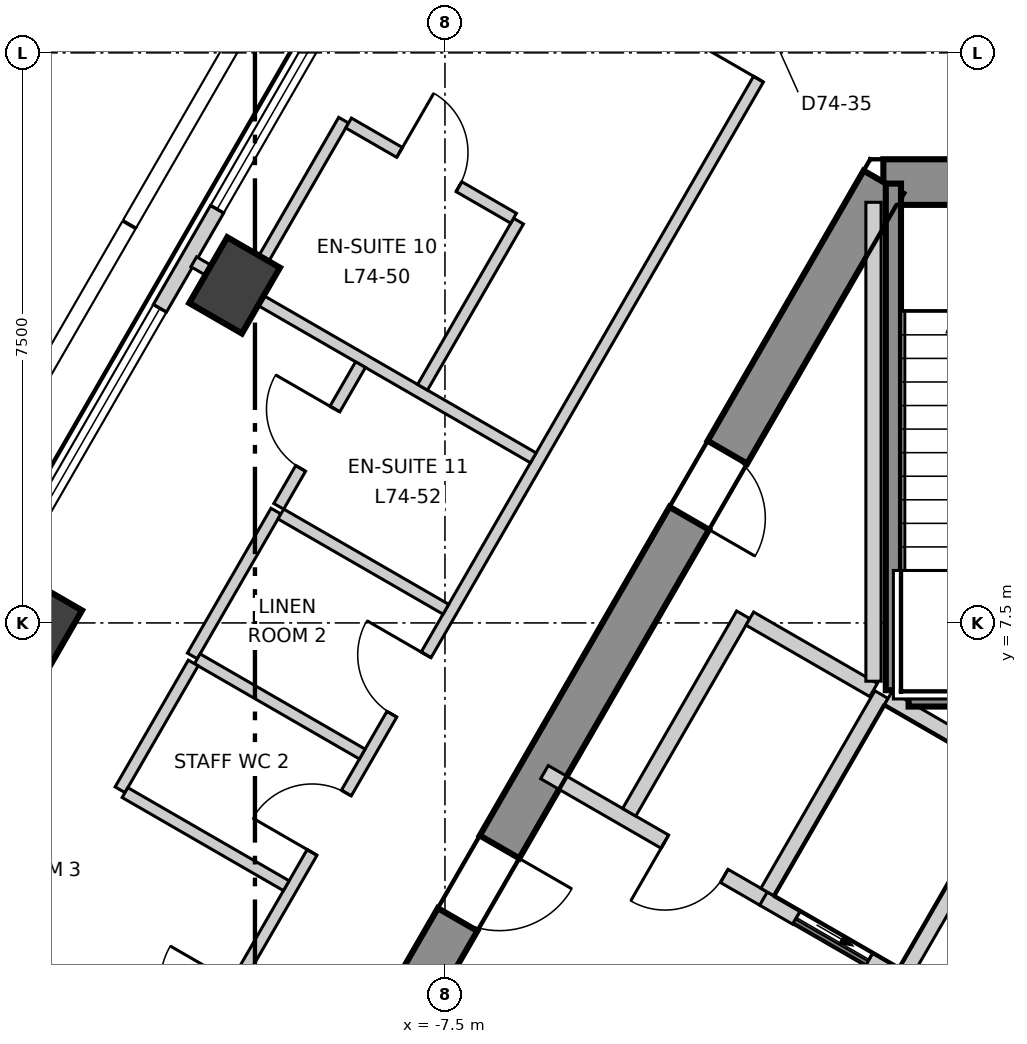
"""IFC4 building model, lengths in metres.
Left out: names, types, materials, properties, quantities, classifications, styles, units other than length and angle.
Written with IfcOpenShell. Run it as: python <this file> out.ifc"""

import sys

from ifc_helpers import new_model, si_unit, direction, frame, frame_2d, origin, origin_2d, place, context, subcontext, project, spatial, polyline, rectangle, outline, extrude, element, fill, save


model = new_model("IFC4")
c1 = context("Model", 3, precision=1e-05, world=origin(), true_north=direction((0.0, 1.0)))
c2 = subcontext(c1, "Body", "Model", "MODEL_VIEW")
j1 = project(units=[si_unit("LENGTHUNIT", "METRE"), si_unit("PLANEANGLEUNIT", "RADIAN")], contexts=[c1])
p1 = place(None, origin())
s1 = spatial("IfcSite", under=j1, at=p1, CompositionType="ELEMENT")
p2 = place(p1, origin())
s2 = spatial("IfcBuilding", under=s1, at=p2, CompositionType="ELEMENT")
p3 = place(p2, frame((0.0, 0.0, 311.5)))
s3 = spatial("IfcBuildingStorey", under=s2, at=p3, CompositionType="ELEMENT", Elevation=311.5)
p4 = place(p3, frame((1.732, 13.3, -0.3), z_axis=(0.0, 0.0, 1.0), x_axis=(-1.0, 0.0, 0.0)))
e1 = element("IfcWall", 1, at=p4, inside=s3, PredefinedType="SHEAR", context=c2, shape_type="SweptSolid", body=[
    extrude(outline(polyline([(-0.173, -0.3), (1.732, -0.3), (3.637, -0.3), (3.291, 0.3), (1.732, 0.3), (0.173, 0.3), (-0.173, -0.3)])), origin(), (0.0, 0.0, 1.0), 3.6),
])
p5 = place(p4, frame((1.032, 0.0, 0.3)))
e2 = element("IfcOpeningElement", 2, at=p5, cuts=e1, PredefinedType="OPENING", context=c2, shape_type="SweptSolid", body=[
    extrude(rectangle(XDim=1.4, YDim=2.1, at=frame_2d((0.7, 1.05))), frame((0.0, 0.31, 0.0), z_axis=(0.0, -1.0, 0.0), x_axis=(1.0, 0.0, 0.0)), (0.0, 0.0, 1.0), 0.62),
])
p6 = place(p3, frame((-1.732, 13.3, -0.3), z_axis=(0.0, 0.0, 1.0), x_axis=(-0.500000539815, -0.866025092122, 0.0)))
e3 = element("IfcWall", 3, at=p6, inside=s3, PredefinedType="SHEAR", context=c2, shape_type="SweptSolid", body=[
    extrude(outline(polyline([(-0.173, -0.3), (1.795, -0.3), (3.763, -0.3), (5.732, -0.3), (7.7, -0.3), (9.668, -0.301), (11.637, -0.301), (13.605, -0.301), (15.573, -0.301), (17.542, -0.301), (19.51, -0.301), (21.478, -0.301), (21.131, 0.3), (19.226, 0.3), (17.321, 0.3), (15.415, 0.3), (13.51, 0.3), (11.605, 0.3), (9.699, 0.3), (7.794, 0.3), (5.889, 0.3), (3.984, 0.3), (2.078, 0.3), (0.173, 0.3), (-0.173, -0.3)])), origin(), (0.0, 0.0, 1.0), 3.6),
])
p7 = place(p6, frame((10.102, 0.0, 0.3)))
e4 = element("IfcOpeningElement", 4, at=p7, cuts=e3, PredefinedType="OPENING", context=c2, shape_type="SweptSolid", body=[
    extrude(rectangle(XDim=1.1, YDim=2.1, at=frame_2d((0.55, 1.05))), frame((0.0, 0.31, 0.0), z_axis=(0.0, -1.0, 0.0), x_axis=(1.0, 0.0, 0.0)), (0.0, 0.0, 1.0), 0.621),
])
p8 = place(p6, frame((16.378, 0.0, 0.3)))
e5 = element("IfcOpeningElement", 5, at=p8, cuts=e3, PredefinedType="OPENING", context=c2, shape_type="SweptSolid", body=[
    extrude(rectangle(XDim=0.9, YDim=2.1, at=frame_2d((0.45, 1.05))), frame((0.0, 0.31, 0.0), z_axis=(0.0, -1.0, 0.0), x_axis=(1.0, 0.0, 0.0)), (0.0, 0.0, 1.0), 0.621),
])
p9 = place(p6, frame((4.106, 0.0, 0.3)))
e6 = element("IfcOpeningElement", 6, at=p9, cuts=e3, PredefinedType="OPENING", context=c2, shape_type="SweptSolid", body=[
    extrude(rectangle(XDim=1.0, YDim=2.1, at=frame_2d((0.5, 1.05))), frame((0.0, 0.31, 0.0), z_axis=(0.0, -1.0, 0.0), x_axis=(1.0, 0.0, 0.0)), (0.0, 0.0, 1.0), 0.621),
])
for number, where, z_axis, x_axis in (
    (7, (-10.268, 11.941, -0.3), (0.0, 0.0, 1.0), (0.5, 0.866, 0.0)),
    (8, (-12.872, 7.432, -0.3), (0.0, 0.0, 1.0), (0.5, 0.866, 0.0)),
):
    element("IfcColumn", number, at=place(p3, frame(where, z_axis=z_axis, x_axis=x_axis)), inside=s3, PredefinedType="COLUMN", context=c2, shape_type="SweptSolid", body=[
        extrude(rectangle(XDim=1.0, YDim=0.8, at=origin_2d()), origin(), (0.0, 0.0, 1.0), 3.6),
    ])
p10 = place(p3, frame((-2.412, 26.948, 0.0), z_axis=(0.0, 0.0, 1.0), x_axis=(-0.500002044679, -0.866024223285, 0.0)))
e9 = element("IfcWall", 9, at=p10, inside=s3, PredefinedType="ELEMENTEDWALL", context=c2, shape_type="SweptSolid", body=[
    extrude(rectangle(XDim=44.243, YDim=0.2, at=frame_2d((22.122, 0.0))), origin(), (0.0, 0.0, 1.0), 3.3),
])
p11 = place(p10, frame((2.056, 0.0, 0.9)))
e10 = element("IfcOpeningElement", 10, at=p11, cuts=e9, PredefinedType="OPENING", context=c2, shape_type="SweptSolid", body=[
    extrude(rectangle(XDim=3.7, YDim=2.2, at=frame_2d((1.85, 1.1))), frame((0.0, 0.11, 0.0), z_axis=(0.0, -1.0, 0.0), x_axis=(1.0, 0.0, 0.0)), (0.0, 0.0, 1.0), 0.22),
])
p12 = place(p10, frame((7.263, 0.0, 0.9)))
e11 = element("IfcOpeningElement", 11, at=p12, cuts=e9, PredefinedType="OPENING", context=c2, shape_type="SweptSolid", body=[
    extrude(rectangle(XDim=3.7, YDim=2.2, at=frame_2d((1.85, 1.1))), frame((0.0, 0.11, 0.0), z_axis=(0.0, -1.0, 0.0), x_axis=(1.0, 0.0, 0.0)), (0.0, 0.0, 1.0), 0.22),
])
p13 = place(p10, frame((12.471, 0.0, 0.9)))
e12 = element("IfcOpeningElement", 12, at=p13, cuts=e9, PredefinedType="OPENING", context=c2, shape_type="SweptSolid", body=[
    extrude(rectangle(XDim=3.7, YDim=2.2, at=frame_2d((1.85, 1.1))), frame((0.0, 0.11, 0.0), z_axis=(0.0, -1.0, 0.0), x_axis=(1.0, 0.0, 0.0)), (0.0, 0.0, 1.0), 0.22),
])
p14 = place(p10, frame((17.678, 0.0, 0.9)))
e13 = element("IfcOpeningElement", 13, at=p14, cuts=e9, PredefinedType="OPENING", context=c2, shape_type="SweptSolid", body=[
    extrude(rectangle(XDim=3.7, YDim=2.2, at=frame_2d((1.85, 1.1))), frame((0.0, 0.11, 0.0), z_axis=(0.0, -1.0, 0.0), x_axis=(1.0, 0.0, 0.0)), (0.0, 0.0, 1.0), 0.22),
])
p15 = place(p10, frame((22.885, 0.0, 0.9)))
e14 = element("IfcOpeningElement", 14, at=p15, cuts=e9, PredefinedType="OPENING", context=c2, shape_type="SweptSolid", body=[
    extrude(rectangle(XDim=3.7, YDim=2.2, at=frame_2d((1.85, 1.1))), frame((0.0, 0.11, 0.0), z_axis=(0.0, -1.0, 0.0), x_axis=(1.0, 0.0, 0.0)), (0.0, 0.0, 1.0), 0.22),
])
p16 = place(p10, frame((28.092, 0.0, 0.9)))
e15 = element("IfcOpeningElement", 15, at=p16, cuts=e9, PredefinedType="OPENING", context=c2, shape_type="SweptSolid", body=[
    extrude(rectangle(XDim=3.7, YDim=2.2, at=frame_2d((1.85, 1.1))), frame((0.0, 0.11, 0.0), z_axis=(0.0, -1.0, 0.0), x_axis=(1.0, 0.0, 0.0)), (0.0, 0.0, 1.0), 0.22),
])
p17 = place(p10, frame((33.3, 0.0, 0.9)))
e16 = element("IfcOpeningElement", 16, at=p17, cuts=e9, PredefinedType="OPENING", context=c2, shape_type="SweptSolid", body=[
    extrude(rectangle(XDim=3.7, YDim=2.2, at=frame_2d((1.85, 1.1))), frame((0.0, 0.11, 0.0), z_axis=(0.0, -1.0, 0.0), x_axis=(1.0, 0.0, 0.0)), (0.0, 0.0, 1.0), 0.22),
])
p18 = place(p10, frame((38.507, 0.0, 0.9)))
e17 = element("IfcOpeningElement", 17, at=p18, cuts=e9, PredefinedType="OPENING", context=c2, shape_type="SweptSolid", body=[
    extrude(rectangle(XDim=3.7, YDim=2.2, at=frame_2d((1.85, 1.1))), frame((0.0, 0.11, 0.0), z_axis=(0.0, -1.0, 0.0), x_axis=(1.0, 0.0, 0.0)), (0.0, 0.0, 1.0), 0.22),
])
p19 = place(p3, frame((-17.678, -10.12, 0.0), z_axis=(0.0, 0.0, 1.0), x_axis=(0.49998824015, 0.86603219323, 0.0)))
e18 = element("IfcWall", 18, at=p19, inside=s3, PredefinedType="PARTITIONING", context=c2, shape_type="SweptSolid", body=[
    extrude(rectangle(XDim=35.357, YDim=0.15, at=frame_2d((17.678, 0.0))), origin(), (0.0, 0.0, 1.0), 3.3),
])
p20 = place(p19, frame((28.607, 0.0, 0.0)))
e19 = element("IfcOpeningElement", 19, at=p20, cuts=e18, PredefinedType="OPENING", context=c2, shape_type="SweptSolid", body=[
    extrude(rectangle(XDim=1.0, YDim=2.1, at=frame_2d((0.5, 1.05))), frame((0.0, 0.085, 0.0), z_axis=(0.0, -1.0, 0.0), x_axis=(1.0, 0.0, 0.0)), (0.0, 0.0, 1.0), 0.17),
])
p21 = place(p19, frame((13.86, 0.0, 0.0)))
e20 = element("IfcOpeningElement", 20, at=p21, cuts=e18, PredefinedType="OPENING", context=c2, shape_type="SweptSolid", body=[
    extrude(rectangle(XDim=1.0, YDim=2.1, at=frame_2d((0.5, 1.05))), frame((0.0, 0.085, 0.0), z_axis=(0.0, -1.0, 0.0), x_axis=(1.0, 0.0, 0.0)), (0.0, 0.0, 1.0), 0.17),
])
p22 = place(p19, frame((18.96, 0.0, 0.0)))
e21 = element("IfcOpeningElement", 21, at=p22, cuts=e18, PredefinedType="OPENING", context=c2, shape_type="SweptSolid", body=[
    extrude(rectangle(XDim=0.9, YDim=2.1, at=frame_2d((0.45, 1.05))), frame((0.0, 0.085, 0.0), z_axis=(0.0, -1.0, 0.0), x_axis=(1.0, 0.0, 0.0)), (0.0, 0.0, 1.0), 0.17),
])
p23 = place(p19, frame((16.86, 0.0, 0.0)))
e22 = element("IfcOpeningElement", 22, at=p23, cuts=e18, PredefinedType="OPENING", context=c2, shape_type="SweptSolid", body=[
    extrude(rectangle(XDim=0.9, YDim=2.1, at=frame_2d((0.45, 1.05))), frame((0.0, 0.085, 0.0), z_axis=(0.0, -1.0, 0.0), x_axis=(1.0, 0.0, 0.0)), (0.0, 0.0, 1.0), 0.17),
])
p24 = place(p19, frame((8.146, 0.0, 0.0)))
e23 = element("IfcOpeningElement", 23, at=p24, cuts=e18, PredefinedType="OPENING", context=c2, shape_type="SweptSolid", body=[
    extrude(rectangle(XDim=1.0, YDim=2.1, at=frame_2d((0.5, 1.05))), frame((0.0, 0.085, 0.0), z_axis=(0.0, -1.0, 0.0), x_axis=(1.0, 0.0, 0.0)), (0.0, 0.0, 1.0), 0.17),
])
p25 = place(p19, frame((3.038, 0.0, 0.0)))
e24 = element("IfcOpeningElement", 24, at=p25, cuts=e18, PredefinedType="OPENING", context=c2, shape_type="SweptSolid", body=[
    extrude(rectangle(XDim=1.0, YDim=2.1, at=frame_2d((0.5, 1.05))), frame((0.0, 0.085, 0.0), z_axis=(0.0, -1.0, 0.0), x_axis=(1.0, 0.0, 0.0)), (0.0, 0.0, 1.0), 0.17),
])
for number, where, z_axis, x_axis in (
    (25, (-16.012, 3.232, 0.0), (0.0, 0.0, 1.0), (0.866, -0.5, 0.0)),
    (26, (-10.805, 12.251, 0.0), (0.0, 0.0, 1.0), (0.866, -0.5, 0.0)),
):
    element("IfcWall", number, at=place(p3, frame(where, z_axis=z_axis, x_axis=x_axis)), inside=s3, PredefinedType="PARTITIONING", context=c2, shape_type="SweptSolid", body=[
        extrude(rectangle(XDim=5.158, YDim=0.15, at=frame_2d((2.579, 0.0))), origin(), (0.0, 0.0, 1.0), 3.3),
    ])
p26 = place(p3, frame((-10.824, 7.066, 0.0), z_axis=(0.0, 0.0, 1.0), x_axis=(0.499994660107, 0.866028486751, 0.0)))
e27 = element("IfcWall", 27, at=p26, inside=s3, PredefinedType="PARTITIONING", context=c2, shape_type="SweptSolid", body=[
    extrude(rectangle(XDim=2.2, YDim=0.15, at=frame_2d((1.1, 0.0))), origin(), (0.0, 0.0, 1.0), 3.3),
])
p27 = place(p3, frame((-10.759, 7.028, 0.0), z_axis=(0.0, 0.0, 1.0), x_axis=(0.866083422639, -0.499899494929, 0.0)))
e28 = element("IfcWall", 28, at=p27, inside=s3, PredefinedType="PARTITIONING", context=c2, shape_type="SweptSolid", body=[
    extrude(rectangle(XDim=2.507, YDim=0.15, at=frame_2d((1.253, 0.0))), origin(), (0.0, 0.0, 1.0), 3.3),
])
p28 = place(p3, frame((-11.775, 5.305, 0.0), z_axis=(0.0, 0.0, 1.0), x_axis=(0.49995654735, 0.86605048973, 0.0)))
e29 = element("IfcWall", 29, at=p28, inside=s3, PredefinedType="PARTITIONING", context=c2, shape_type="SweptSolid", body=[
    extrude(rectangle(XDim=1.926, YDim=0.15, at=frame_2d((0.963, 0.0))), origin(), (0.0, 0.0, 1.0), 3.3),
])
p29 = place(p3, frame((-11.71, 5.268, 0.0), z_axis=(0.0, 0.0, 1.0), x_axis=(0.8660395779, -0.499975448907, 0.0)))
e30 = element("IfcWall", 30, at=p29, inside=s3, PredefinedType="PARTITIONING", context=c2, shape_type="SweptSolid", body=[
    extrude(rectangle(XDim=2.45, YDim=0.15, at=frame_2d((1.225, 0.0))), origin(), (0.0, 0.0, 1.0), 3.3),
])
p30 = place(p3, frame((-9.659, 8.933, 0.0), z_axis=(0.0, 0.0, 1.0), x_axis=(0.866059082011, -0.499941663064, 0.0)))
e31 = element("IfcWall", 31, at=p30, inside=s3, PredefinedType="PARTITIONING", context=c2, shape_type="SweptSolid", body=[
    extrude(rectangle(XDim=2.507, YDim=0.15, at=frame_2d((1.253, 0.0))), origin(), (0.0, 0.0, 1.0), 3.3),
])
p31 = place(p3, frame((-10.095, 11.928, 0.0), z_axis=(0.0, 0.0, 1.0), x_axis=(0.499956887143, 0.866050293573, 0.0)))
e32 = element("IfcWall", 32, at=p31, inside=s3, PredefinedType="PARTITIONING", context=c2, shape_type="SweptSolid", body=[
    extrude(rectangle(XDim=2.524, YDim=0.15, at=frame_2d((1.262, 0.0))), origin(), (0.0, 0.0, 1.0), 2.6),
])
p32 = place(p3, frame((-7.795, 10.6, 0.0), z_axis=(0.0, 0.0, 1.0), x_axis=(0.50028887667, 0.865858556509, 0.0)))
e33 = element("IfcWall", 33, at=p32, inside=s3, PredefinedType="PARTITIONING", context=c2, shape_type="SweptSolid", body=[
    extrude(rectangle(XDim=2.524, YDim=0.15, at=frame_2d((1.262, 0.0))), origin(), (0.0, 0.0, 1.0), 3.3),
])
p33 = place(p3, frame((-9.687, 9.034, 0.0), z_axis=(0.0, 0.0, 1.0), x_axis=(0.499909024581, 0.866077922096, 0.0)))
e34 = element("IfcWall", 34, at=p33, inside=s3, PredefinedType="PARTITIONING", context=c2, shape_type="SweptSolid", body=[
    extrude(rectangle(XDim=2.152, YDim=0.15, at=frame_2d((1.076, 0.0))), origin(), (0.0, 0.0, 1.0), 3.3),
])
p34 = place(p33, frame((0.577, 0.0, 0.0)))
e35 = element("IfcOpeningElement", 35, at=p34, cuts=e34, PredefinedType="OPENING", context=c2, shape_type="SweptSolid", body=[
    extrude(rectangle(XDim=0.9, YDim=2.1, at=frame_2d((0.45, 1.05))), frame((0.0, 0.085, 0.0), z_axis=(0.0, -1.0, 0.0), x_axis=(1.0, 0.0, 0.0)), (0.0, 0.0, 1.0), 0.17),
])
p35 = place(p3, frame((-8.768, 14.077, 0.0), z_axis=(0.0, 0.0, 1.0), x_axis=(0.866125586781, -0.4998264378, 0.0)))
e36 = element("IfcWall", 36, at=p35, inside=s3, PredefinedType="PARTITIONING", context=c2, shape_type="SweptSolid", body=[
    extrude(rectangle(XDim=2.507, YDim=0.15, at=frame_2d((1.253, 0.0))), origin(), (0.0, 0.0, 1.0), 3.3),
])
p36 = place(p35, frame((0.775, 0.0, 0.0)))
e37 = element("IfcOpeningElement", 37, at=p36, cuts=e36, PredefinedType="OPENING", context=c2, shape_type="SweptSolid", body=[
    extrude(rectangle(XDim=0.9, YDim=2.1, at=frame_2d((0.45, 1.05))), frame((0.0, 0.085, 0.0), z_axis=(0.0, -1.0, 0.0), x_axis=(1.0, 0.0, 0.0)), (0.0, 0.0, 1.0), 0.17),
])
p37 = place(p3, frame((-6.191, 5.537, 0.0), z_axis=(0.0, 0.0, 1.0), x_axis=(0.866052607023, -0.499952879648, 0.0)))
e38 = element("IfcWall", 38, at=p37, inside=s3, PredefinedType="SOLIDWALL", context=c2, shape_type="SweptSolid", body=[
    extrude(rectangle(XDim=3.332, YDim=0.2, at=frame_2d((1.666, 0.0))), origin(), (0.0, 0.0, 1.0), 3.3),
])
p38 = place(p37, frame((1.83, 0.0, 0.0)))
e39 = element("IfcOpeningElement", 39, at=p38, cuts=e38, PredefinedType="OPENING", context=c2, shape_type="SweptSolid", body=[
    extrude(rectangle(XDim=0.9, YDim=2.1, at=frame_2d((0.45, 1.05))), frame((0.0, 0.11, 0.0), z_axis=(0.0, -1.0, 0.0), x_axis=(1.0, 0.0, 0.0)), (0.0, 0.0, 1.0), 0.22),
])
p39 = place(p3, frame((-5.076, 5.009, 0.0), z_axis=(0.0, 0.0, 1.0), x_axis=(0.50002537861, 0.866010750942, 0.0)))
e40 = element("IfcWall", 40, at=p39, inside=s3, PredefinedType="SOLIDWALL", context=c2, shape_type="SweptSolid", body=[
    extrude(rectangle(XDim=3.0, YDim=0.2, at=frame_2d((1.5, 0.0))), origin(), (0.0, 0.0, 1.0), 3.3),
])
p40 = place(p3, frame((-3.489, 7.557, 0.0), z_axis=(0.0, 0.0, 1.0), x_axis=(0.866012558475, -0.500022248069, 0.0)))
e41 = element("IfcWall", 41, at=p40, inside=s3, PredefinedType="SOLIDWALL", context=c2, shape_type="SweptSolid", body=[
    extrude(rectangle(XDim=1.88, YDim=0.2, at=frame_2d((0.94, 0.0))), origin(), (0.0, 0.0, 1.0), 3.3),
])
p41 = place(p3, frame((-3.309, 3.873, 0.0), z_axis=(0.0, 0.0, 1.0), x_axis=(0.866098583652, -0.499873227325, 0.0)))
e42 = element("IfcWall", 42, at=p41, inside=s3, PredefinedType="SOLIDWALL", context=c2, shape_type="SweptSolid", body=[
    extrude(rectangle(XDim=2.103, YDim=0.2, at=frame_2d((1.051, 0.0))), origin(), (0.0, 0.0, 1.0), 3.3),
])
p42 = place(p41, frame((0.502, 0.0, 0.0)))
e43 = element("IfcOpeningElement", 43, at=p42, cuts=e42, PredefinedType="OPENING", context=c2, shape_type="SweptSolid", body=[
    extrude(rectangle(XDim=1.1, YDim=2.1, at=frame_2d((0.55, 1.05))), frame((0.0, 0.11, 0.0), z_axis=(0.0, -1.0, 0.0), x_axis=(1.0, 0.0, 0.0)), (0.0, 0.0, 1.0), 0.22),
])
p43 = place(p3, frame((-3.257, 3.959, 0.0), z_axis=(0.0, 0.0, 1.0), x_axis=(0.50002537861, 0.866010750942, 0.0)))
e44 = element("IfcWall", 44, at=p43, inside=s3, PredefinedType="SOLIDWALL", context=c2, shape_type="SweptSolid", body=[
    extrude(rectangle(XDim=3.0, YDim=0.2, at=frame_2d((1.5, 0.0))), origin(), (0.0, 0.0, 1.0), 3.3),
])
p44 = place(p3, frame((-1.67, 6.507, 0.0), z_axis=(0.0, 0.0, 1.0), x_axis=(0.865941441609, -0.500145398563, 0.0)))
e45 = element("IfcWall", 45, at=p44, inside=s3, PredefinedType="SOLIDWALL", context=c2, shape_type="SweptSolid", body=[
    extrude(rectangle(XDim=1.815, YDim=0.2, at=frame_2d((0.908, 0.0))), origin(), (0.0, 0.0, 1.0), 3.3),
])
p45 = place(p3, frame((-1.438, 2.909, 0.0), z_axis=(0.0, 0.0, 1.0), x_axis=(0.499829630636, 0.866123744241, 0.0)))
e46 = element("IfcWall", 46, at=p45, inside=s3, PredefinedType="SOLIDWALL", context=c2, shape_type="SweptSolid", body=[
    extrude(rectangle(XDim=2.761, YDim=0.2, at=frame_2d((1.38, 0.0))), origin(), (0.0, 0.0, 1.0), 3.3),
])
p46 = place(p3, frame((-1.862, 6.733, 0.0), z_axis=(0.0, 0.0, 1.0), x_axis=(0.0, 1.0, 0.0)))
e47 = element("IfcWall", 47, at=p46, inside=s3, PredefinedType="SOLIDWALL", context=c2, shape_type="SweptSolid", body=[
    extrude(rectangle(XDim=6.301, YDim=0.2, at=frame_2d((3.15, 0.0))), origin(), (0.0, 0.0, 1.0), 3.3),
])
p47 = place(p3, frame((-1.4, 6.5, 0.0), z_axis=(0.0, 0.0, 1.0), x_axis=(1.0, 0.0, 0.0)))
e48 = element("IfcWall", 48, at=p47, inside=s3, PredefinedType="SOLIDWALL", context=c2, shape_type="SweptSolid", body=[
    extrude(rectangle(XDim=2.8, YDim=0.2, at=frame_2d((1.4, 0.0))), origin(), (0.0, 0.0, 1.0), 3.3),
])
p48 = place(p3, frame((-1.6, 6.615, 0.0), z_axis=(0.0, 0.0, 1.0), x_axis=(0.0, 1.0, 0.0)))
e49 = element("IfcWall", 49, at=p48, inside=s3, PredefinedType="SOLIDWALL", context=c2, shape_type="SweptSolid", body=[
    extrude(rectangle(XDim=6.665, YDim=0.2, at=frame_2d((3.333, 0.0))), origin(), (0.0, 0.0, 1.0), 3.3),
])
p49 = place(p13, origin())
e50 = element("IfcWindow", 50, at=p49, inside=s3, PartitioningType="SINGLE_PANEL", PredefinedType="WINDOW", context=c2, shape_type="SweptSolid", body=[
    extrude(rectangle(XDim=3.7, YDim=2.2, at=frame_2d((1.85, 1.1))), frame((0.0, 0.03, 0.0), z_axis=(0.0, -1.0, 0.0), x_axis=(1.0, 0.0, 0.0)), (0.0, 0.0, 1.0), 0.06),
])
fill(e12, e50)
p50 = place(p14, origin())
e51 = element("IfcWindow", 51, at=p50, inside=s3, PartitioningType="SINGLE_PANEL", PredefinedType="WINDOW", context=c2, shape_type="SweptSolid", body=[
    extrude(rectangle(XDim=3.7, YDim=2.2, at=frame_2d((1.85, 1.1))), frame((0.0, 0.03, 0.0), z_axis=(0.0, -1.0, 0.0), x_axis=(1.0, 0.0, 0.0)), (0.0, 0.0, 1.0), 0.06),
])
fill(e13, e51)
p51 = place(p42, origin())
e52 = element("IfcDoor", 52, at=p51, inside=s3, OperationType="SLIDING_TO_LEFT", PredefinedType="DOOR", context=c2, shape_type="SweptSolid", body=[
    extrude(rectangle(XDim=1.1, YDim=2.1, at=frame_2d((0.55, 1.05))), frame((0.0, 0.025, 0.0), z_axis=(0.0, -1.0, 0.0), x_axis=(1.0, 0.0, 0.0)), (0.0, 0.0, 1.0), 0.05),
])
fill(e43, e52)
p52 = place(p38, origin())
e53 = element("IfcDoor", 53, at=p52, inside=s3, OperationType="SINGLE_SWING_LEFT", PredefinedType="DOOR", context=c2, shape_type="SweptSolid", body=[
    extrude(rectangle(XDim=0.9, YDim=2.1, at=frame_2d((0.45, 1.05))), frame((0.0, 0.025, 0.0), z_axis=(0.0, -1.0, 0.0), x_axis=(1.0, 0.0, 0.0)), (0.0, 0.0, 1.0), 0.05),
])
fill(e39, e53)
p53 = place(p20, origin())
e54 = element("IfcDoor", 54, at=p53, inside=s3, OperationType="SINGLE_SWING_RIGHT", PredefinedType="DOOR", context=c2, shape_type="SweptSolid", body=[
    extrude(rectangle(XDim=1.0, YDim=2.1, at=frame_2d((0.5, 1.05))), frame((0.0, 0.025, 0.0), z_axis=(0.0, -1.0, 0.0), x_axis=(1.0, 0.0, 0.0)), (0.0, 0.0, 1.0), 0.05),
])
fill(e19, e54)
p54 = place(p36, origin())
e55 = element("IfcDoor", 55, at=p54, inside=s3, OperationType="SINGLE_SWING_RIGHT", PredefinedType="DOOR", context=c2, shape_type="SweptSolid", body=[
    extrude(rectangle(XDim=0.9, YDim=2.1, at=frame_2d((0.45, 1.05))), frame((0.0, 0.025, 0.0), z_axis=(0.0, -1.0, 0.0), x_axis=(1.0, 0.0, 0.0)), (0.0, 0.0, 1.0), 0.05),
])
fill(e37, e55)
p55 = place(p34, origin())
e56 = element("IfcDoor", 56, at=p55, inside=s3, OperationType="SINGLE_SWING_LEFT", PredefinedType="DOOR", context=c2, shape_type="SweptSolid", body=[
    extrude(rectangle(XDim=0.9, YDim=2.1, at=frame_2d((0.45, 1.05))), frame((0.0, 0.025, 0.0), z_axis=(0.0, -1.0, 0.0), x_axis=(1.0, 0.0, 0.0)), (0.0, 0.0, 1.0), 0.05),
])
fill(e35, e56)
p56 = place(p22, origin())
e57 = element("IfcDoor", 57, at=p56, inside=s3, OperationType="SINGLE_SWING_LEFT", PredefinedType="DOOR", context=c2, shape_type="SweptSolid", body=[
    extrude(rectangle(XDim=0.9, YDim=2.1, at=frame_2d((0.45, 1.05))), frame((0.0, 0.025, 0.0), z_axis=(0.0, -1.0, 0.0), x_axis=(1.0, 0.0, 0.0)), (0.0, 0.0, 1.0), 0.05),
])
fill(e21, e57)
p57 = place(p23, origin())
e58 = element("IfcDoor", 58, at=p57, inside=s3, OperationType="SINGLE_SWING_RIGHT", PredefinedType="DOOR", context=c2, shape_type="SweptSolid", body=[
    extrude(rectangle(XDim=0.9, YDim=2.1, at=frame_2d((0.45, 1.05))), frame((0.0, 0.025, 0.0), z_axis=(0.0, -1.0, 0.0), x_axis=(1.0, 0.0, 0.0)), (0.0, 0.0, 1.0), 0.05),
])
fill(e22, e58)
p58 = place(p7, origin())
e59 = element("IfcDoor", 59, at=p58, inside=s3, OperationType="SINGLE_SWING_RIGHT", PredefinedType="DOOR", context=c2, shape_type="SweptSolid", body=[
    extrude(rectangle(XDim=1.1, YDim=2.1, at=frame_2d((0.55, 1.05))), frame((0.0, 0.025, 0.0), z_axis=(0.0, -1.0, 0.0), x_axis=(1.0, 0.0, 0.0)), (0.0, 0.0, 1.0), 0.05),
])
fill(e4, e59)
p59 = place(p9, origin())
e60 = element("IfcDoor", 60, at=p59, inside=s3, OperationType="SINGLE_SWING_LEFT", PredefinedType="DOOR", context=c2, shape_type="SweptSolid", body=[
    extrude(rectangle(XDim=1.0, YDim=2.1, at=frame_2d((0.5, 1.05))), frame((0.0, 0.025, 0.0), z_axis=(0.0, -1.0, 0.0), x_axis=(1.0, 0.0, 0.0)), (0.0, 0.0, 1.0), 0.05),
])
fill(e6, e60)
save(model, sys.argv[1])
